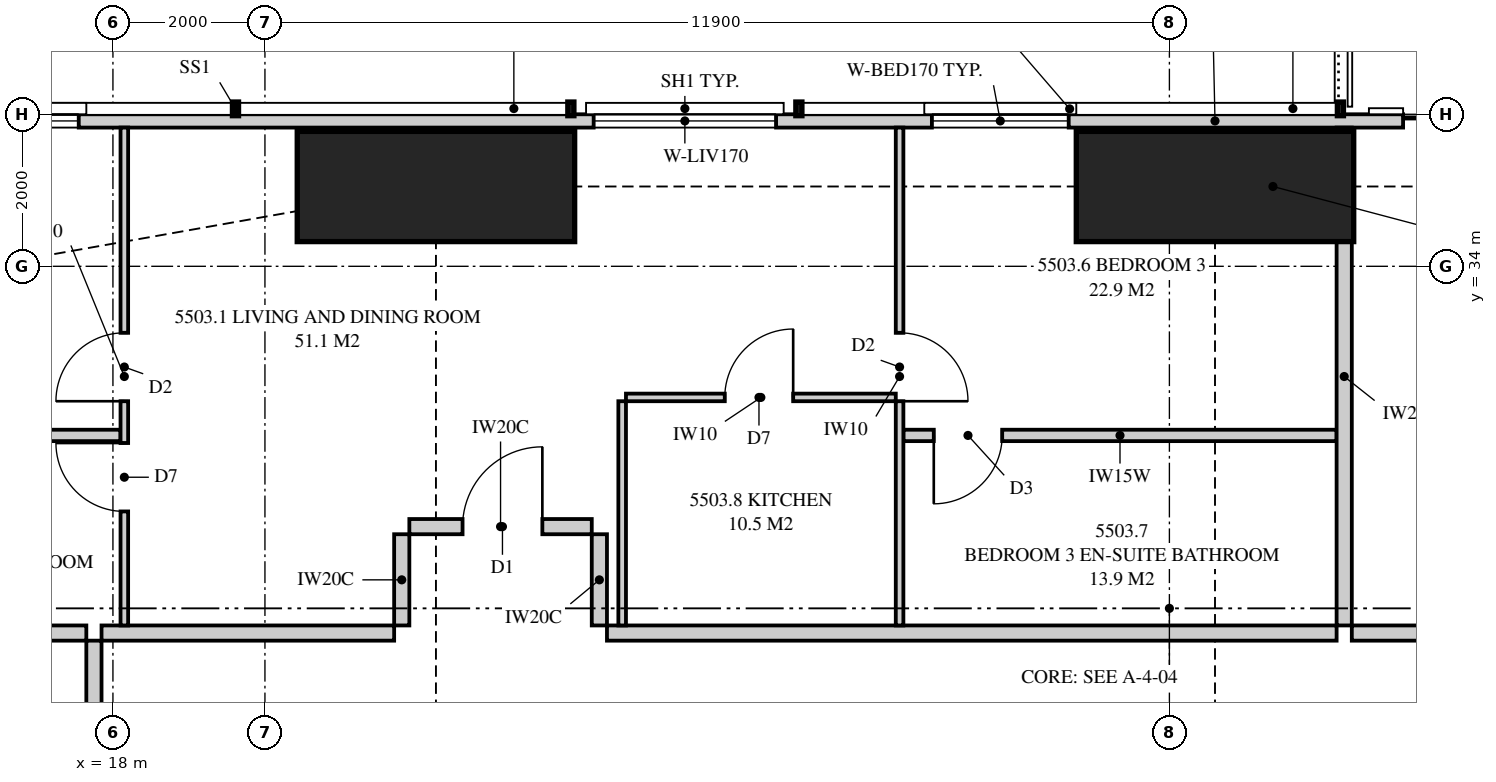
"""IFC4 building model, lengths in metres.
Left out: names, types, materials, properties, quantities, classifications, styles, units other than length and angle.
Written with IfcOpenShell. Run it as: python <this file> out.ifc"""

import sys

from ifc_helpers import new_model, si_unit, direction, frame, frame_2d, origin, origin_2d, place, context, subcontext, project, spatial, polyline, rectangle, outline, extrude, element, fill, save


model = new_model("IFC4")
c1 = context("Model", 3, precision=1e-05, world=origin(), true_north=direction((0.0, 1.0)))
c2 = subcontext(c1, "Body", "Model", "MODEL_VIEW")
j1 = project(units=[si_unit("LENGTHUNIT", "METRE"), si_unit("PLANEANGLEUNIT", "RADIAN")], contexts=[c1])
p1 = place(None, origin())
s1 = spatial("IfcSite", under=j1, at=p1, CompositionType="ELEMENT")
p2 = place(p1, origin())
s2 = spatial("IfcBuilding", under=s1, at=p2, CompositionType="ELEMENT")
p3 = place(p2, frame((0.0, 0.0, 201.25)))
s3 = spatial("IfcBuildingStorey", under=s2, at=p3, CompositionType="ELEMENT", Elevation=201.25)
for number, where, z_axis, x_axis in (
    (1, (32.5, 35.05, 0.0), (0.0, 0.0, 1.0), (0.0, 1.0, 0.0)),
    (2, (22.25, 35.05, 0.0), (0.0, 0.0, 1.0), (0.0, 1.0, 0.0)),
):
    element("IfcColumn", number, at=place(p3, frame(where, z_axis=z_axis, x_axis=x_axis)), inside=s3, PredefinedType="COLUMN", context=c2, shape_type="SweptSolid", body=[
        extrude(rectangle(XDim=1.45, YDim=3.65, at=origin_2d()), origin(), (0.0, 0.0, 1.0), 3.35),
    ])
p4 = place(p3, frame((49.949, 35.913, 0.0), z_axis=(0.0, 0.0, 1.0), x_axis=(-1.0, 0.0, 0.0)))
e3 = element("IfcWall", 3, at=p4, inside=s3, PredefinedType="SOLIDWALL", context=c2, shape_type="SweptSolid", body=[
    extrude(outline(polyline([(0.0, 0.0), (34.897, 0.0), (34.897, 3.11), (27.91, 3.11), (27.91, 2.15), (27.836, 2.15), (27.836, 3.11), (27.699, 3.11), (27.699, 2.15), (7.199, 2.15), (7.199, 3.11), (7.062, 3.11), (7.062, 2.15), (6.987, 2.15), (6.987, 3.11), (0.0, 3.11), (0.0, 0.0)])), frame((0.0, 0.087, 0.0), z_axis=(0.0, -1.0, 0.0), x_axis=(1.0, 0.0, 0.0)), (0.0, 0.0, 1.0), 0.175),
])
p5 = place(p4, frame((13.174, 0.0, 0.0)))
e4 = element("IfcOpeningElement", 4, at=p5, cuts=e3, PredefinedType="OPENING", context=c2, shape_type="SweptSolid", body=[
    extrude(rectangle(XDim=1.8, YDim=2.1, at=frame_2d((0.9, 1.05))), frame((0.0, 0.097, 0.0), z_axis=(0.0, -1.0, 0.0), x_axis=(1.0, 0.0, 0.0)), (0.0, 0.0, 1.0), 0.195),
])
p6 = place(p4, frame((19.374, 0.0, 0.4)))
e5 = element("IfcOpeningElement", 5, at=p6, cuts=e3, PredefinedType="OPENING", context=c2, shape_type="SweptSolid", body=[
    extrude(rectangle(XDim=1.8, YDim=1.7, at=frame_2d((0.9, 0.85))), frame((0.0, 0.097, 0.0), z_axis=(0.0, -1.0, 0.0), x_axis=(1.0, 0.0, 0.0)), (0.0, 0.0, 1.0), 0.195),
])
p7 = place(p4, frame((23.224, 0.0, 0.4)))
e6 = element("IfcOpeningElement", 6, at=p7, cuts=e3, PredefinedType="OPENING", context=c2, shape_type="SweptSolid", body=[
    extrude(rectangle(XDim=2.4, YDim=1.7, at=frame_2d((1.2, 0.85))), frame((0.0, 0.097, 0.0), z_axis=(0.0, -1.0, 0.0), x_axis=(1.0, 0.0, 0.0)), (0.0, 0.0, 1.0), 0.195),
])
p8 = place(p4, frame((32.399, 0.0, 0.4)))
e7 = element("IfcOpeningElement", 7, at=p8, cuts=e3, PredefinedType="OPENING", context=c2, shape_type="SweptSolid", body=[
    extrude(rectangle(XDim=1.8, YDim=1.7, at=frame_2d((0.9, 0.85))), frame((0.0, 0.097, 0.0), z_axis=(0.0, -1.0, 0.0), x_axis=(1.0, 0.0, 0.0)), (0.0, 0.0, 1.0), 0.195),
])
p9 = place(p3, frame((34.2, 35.825, 0.0), z_axis=(0.0, 0.0, 1.0), x_axis=(0.0, -1.0, 0.0)))
e8 = element("IfcWall", 8, at=p9, inside=s3, PredefinedType="PARTITIONING", context=c2, shape_type="SweptSolid", body=[
    extrude(outline(polyline([(0.0, 0.0), (6.55, 0.0), (6.55, 3.11), (1.685, 3.11), (1.685, 2.15), (0.0, 2.15), (0.0, 3.11), (0.0, 0.0)])), frame((0.0, 0.1, 0.0), z_axis=(0.0, -1.0, 0.0), x_axis=(1.0, 0.0, 0.0)), (0.0, 0.0, 1.0), 0.2),
])
p10 = place(p3, frame((17.85, 29.175, 0.0), z_axis=(0.0, 0.0, 1.0), x_axis=(1.0, 0.0, 0.0)))
e9 = element("IfcWall", 9, at=p10, inside=s3, PredefinedType="PARTITIONING", context=c2, shape_type="SweptSolid", body=[
    extrude(rectangle(XDim=3.85, YDim=0.2, at=frame_2d((1.925, 0.0))), origin(), (0.0, 0.0, 1.0), 3.11),
])
p11 = place(p3, frame((18.15, 35.825, 0.0), z_axis=(0.0, 0.0, 1.0), x_axis=(0.0, -1.0, 0.0)))
e10 = element("IfcWall", 10, at=p11, inside=s3, PredefinedType="PARTITIONING", context=c2, shape_type="SweptSolid", body=[
    extrude(outline(polyline([(0.0, 0.0), (6.55, 0.0), (6.55, 3.11), (2.374, 3.11), (2.374, 2.15), (0.627, 2.15), (0.627, 3.11), (0.0, 3.11), (0.0, 0.0)])), frame((0.0, 0.05, 0.0), z_axis=(0.0, -1.0, 0.0), x_axis=(1.0, 0.0, 0.0)), (0.0, 0.0, 1.0), 0.1),
])
p12 = place(p11, frame((2.7, 0.0, 0.0)))
e11 = element("IfcOpeningElement", 11, at=p12, cuts=e10, PredefinedType="OPENING", context=c2, shape_type="SweptSolid", body=[
    extrude(rectangle(XDim=0.9, YDim=2.1, at=frame_2d((0.45, 1.05))), frame((0.0, 0.06, 0.0), z_axis=(0.0, -1.0, 0.0), x_axis=(1.0, 0.0, 0.0)), (0.0, 0.0, 1.0), 0.12),
])
p13 = place(p11, frame((4.15, 0.0, 0.0)))
e12 = element("IfcOpeningElement", 12, at=p13, cuts=e10, PredefinedType="OPENING", context=c2, shape_type="SweptSolid", body=[
    extrude(rectangle(XDim=0.9, YDim=2.1, at=frame_2d((0.45, 1.05))), frame((0.0, 0.06, 0.0), z_axis=(0.0, -1.0, 0.0), x_axis=(1.0, 0.0, 0.0)), (0.0, 0.0, 1.0), 0.12),
])
p14 = place(p3, frame((28.35, 35.825, 0.0), z_axis=(0.0, 0.0, 1.0), x_axis=(0.0, -1.0, 0.0)))
e13 = element("IfcWall", 13, at=p14, inside=s3, PredefinedType="PARTITIONING", context=c2, shape_type="SweptSolid", body=[
    extrude(outline(polyline([(0.0, 0.0), (6.55, 0.0), (6.55, 3.11), (1.635, 3.11), (1.635, 2.15), (0.0, 2.15), (0.0, 3.11), (0.0, 0.0)])), frame((0.0, 0.05, 0.0), z_axis=(0.0, -1.0, 0.0), x_axis=(1.0, 0.0, 0.0)), (0.0, 0.0, 1.0), 0.1),
])
p15 = place(p14, frame((2.7, 0.0, 0.0)))
e14 = element("IfcOpeningElement", 14, at=p15, cuts=e13, PredefinedType="OPENING", context=c2, shape_type="SweptSolid", body=[
    extrude(rectangle(XDim=0.9, YDim=2.1, at=frame_2d((0.45, 1.05))), frame((0.0, 0.06, 0.0), z_axis=(0.0, -1.0, 0.0), x_axis=(1.0, 0.0, 0.0)), (0.0, 0.0, 1.0), 0.12),
])
p16 = place(p3, frame((15.2, 31.775, 0.0), z_axis=(0.0, 0.0, 1.0), x_axis=(1.0, 0.0, 0.0)))
e15 = element("IfcWall", 15, at=p16, inside=s3, PredefinedType="PLUMBINGWALL", context=c2, shape_type="SweptSolid", body=[
    extrude(rectangle(XDim=2.9, YDim=0.15, at=frame_2d((1.45, 0.0))), origin(), (0.0, 0.0, 1.0), 3.11),
])
p17 = place(p3, frame((28.4, 31.775, 0.0), z_axis=(0.0, 0.0, 1.0), x_axis=(1.0, 0.0, 0.0)))
e16 = element("IfcWall", 16, at=p17, inside=s3, PredefinedType="PLUMBINGWALL", context=c2, shape_type="SweptSolid", body=[
    extrude(outline(polyline([(0.0, 0.0), (5.7, 0.0), (5.7, 3.11), (4.412, 3.11), (4.412, 2.541), (3.788, 2.541), (3.788, 3.11), (0.0, 3.11), (0.0, 0.0)])), frame((0.0, 0.075, 0.0), z_axis=(0.0, -1.0, 0.0), x_axis=(1.0, 0.0, 0.0)), (0.0, 0.0, 1.0), 0.15),
])
p18 = place(p17, frame((0.4, 0.0, 0.0)))
e17 = element("IfcOpeningElement", 17, at=p18, cuts=e16, PredefinedType="OPENING", context=c2, shape_type="SweptSolid", body=[
    extrude(rectangle(XDim=0.9, YDim=2.1, at=frame_2d((0.45, 1.05))), frame((0.0, 0.085, 0.0), z_axis=(0.0, -1.0, 0.0), x_axis=(1.0, 0.0, 0.0)), (0.0, 0.0, 1.0), 0.17),
])
p19 = place(p3, frame((24.75, 32.275, 0.0), z_axis=(0.0, 0.0, 1.0), x_axis=(1.0, 0.0, 0.0)))
e18 = element("IfcWall", 18, at=p19, inside=s3, PredefinedType="PARTITIONING", context=c2, shape_type="SweptSolid", body=[
    extrude(rectangle(XDim=3.55, YDim=0.1, at=frame_2d((1.775, 0.0))), origin(), (0.0, 0.0, 1.0), 3.11),
])
p20 = place(p19, frame((1.3, 0.0, 0.0)))
e19 = element("IfcOpeningElement", 19, at=p20, cuts=e18, PredefinedType="OPENING", context=c2, shape_type="SweptSolid", body=[
    extrude(rectangle(XDim=0.9, YDim=2.1, at=frame_2d((0.45, 1.05))), frame((0.0, 0.06, 0.0), z_axis=(0.0, -1.0, 0.0), x_axis=(1.0, 0.0, 0.0)), (0.0, 0.0, 1.0), 0.12),
])
p21 = place(p3, frame((24.7, 32.225, 0.0), z_axis=(0.0, 0.0, 1.0), x_axis=(0.0, -1.0, 0.0)))
e20 = element("IfcWall", 20, at=p21, inside=s3, PredefinedType="PARTITIONING", context=c2, shape_type="SweptSolid", body=[
    extrude(rectangle(XDim=2.95, YDim=0.1, at=frame_2d((1.475, 0.0))), origin(), (0.0, 0.0, 1.0), 3.11),
])
p22 = place(p3, frame((34.3, 29.175, 0.0), z_axis=(0.0, 0.0, 1.0), x_axis=(1.0, 0.0, 0.0)))
e21 = element("IfcWall", 21, at=p22, inside=s3, PredefinedType="PARTITIONING", context=c2, shape_type="SweptSolid", body=[
    extrude(rectangle(XDim=3.625, YDim=0.2, at=frame_2d((1.812, 0.0))), origin(), (0.0, 0.0, 1.0), 3.11),
])
p23 = place(p3, frame((12.0, 29.175, 0.0), z_axis=(0.0, 0.0, 1.0), x_axis=(1.0, 0.0, 0.0)))
e22 = element("IfcWall", 22, at=p23, inside=s3, PredefinedType="PARTITIONING", context=c2, shape_type="SweptSolid", body=[
    extrude(outline(polyline([(0.0, 0.0), (5.65, 0.0), (5.65, 3.11), (2.547, 3.11), (2.547, 2.15), (0.703, 2.15), (0.703, 3.11), (0.0, 3.11), (0.0, 0.0)])), frame((0.0, 0.1, 0.0), z_axis=(0.0, -1.0, 0.0), x_axis=(1.0, 0.0, 0.0)), (0.0, 0.0, 1.0), 0.2),
])
p24 = place(p3, frame((17.75, 23.05, 0.0), z_axis=(0.0, 0.0, 1.0), x_axis=(0.0, 1.0, 0.0)))
e23 = element("IfcWall", 23, at=p24, inside=s3, PredefinedType="PARTITIONING", context=c2, shape_type="SweptSolid", body=[
    extrude(outline(polyline([(0.0, 0.0), (6.025, 0.0), (6.025, 3.11), (2.287, 3.11), (2.287, 2.541), (1.613, 2.541), (1.613, 3.11), (0.0, 3.11), (0.0, 0.0)])), frame((0.0, 0.1, 0.0), z_axis=(0.0, -1.0, 0.0), x_axis=(1.0, 0.0, 0.0)), (0.0, 0.0, 1.0), 0.2),
])
p25 = place(p24, frame((2.512, 0.0, 0.0)))
e24 = element("IfcOpeningElement", 24, at=p25, cuts=e23, PredefinedType="OPENING", context=c2, shape_type="SweptSolid", body=[
    extrude(rectangle(XDim=1.05, YDim=2.2, at=frame_2d((0.525, 1.1))), frame((0.0, 0.11, 0.0), z_axis=(0.0, -1.0, 0.0), x_axis=(1.0, 0.0, 0.0)), (0.0, 0.0, 1.0), 0.22),
])
p26 = place(p3, frame((24.5, 29.175, 0.0), z_axis=(0.0, 0.0, 1.0), x_axis=(1.0, 0.0, 0.0)))
e25 = element("IfcWall", 25, at=p26, inside=s3, PredefinedType="PARTITIONING", context=c2, shape_type="SweptSolid", body=[
    extrude(outline(polyline([(0.0, 0.0), (9.6, 0.0), (9.6, 3.11), (8.337, 3.11), (8.337, 2.541), (7.663, 2.541), (7.663, 3.11), (0.0, 3.11), (0.0, 0.0)])), frame((0.0, 0.1, 0.0), z_axis=(0.0, -1.0, 0.0), x_axis=(1.0, 0.0, 0.0)), (0.0, 0.0, 1.0), 0.2),
])
p27 = place(p3, frame((21.9, 30.575, 0.0), z_axis=(0.0, 0.0, 1.0), x_axis=(1.0, 0.0, 0.0)))
e26 = element("IfcWall", 26, at=p27, inside=s3, PredefinedType="PARTITIONING", context=c2, shape_type="SweptSolid", body=[
    extrude(outline(polyline([(0.0, 0.0), (2.4, 0.0), (2.4, 3.11), (0.687, 3.11), (0.687, 2.541), (0.013, 2.541), (0.013, 3.11), (0.0, 3.11), (0.0, 0.0)])), frame((0.0, 0.1, 0.0), z_axis=(0.0, -1.0, 0.0), x_axis=(1.0, 0.0, 0.0)), (0.0, 0.0, 1.0), 0.2),
])
p28 = place(p27, frame((0.7, 0.0, 0.0)))
e27 = element("IfcOpeningElement", 27, at=p28, cuts=e26, PredefinedType="OPENING", context=c2, shape_type="SweptSolid", body=[
    extrude(rectangle(XDim=1.05, YDim=2.2, at=frame_2d((0.525, 1.1))), frame((0.0, 0.11, 0.0), z_axis=(0.0, -1.0, 0.0), x_axis=(1.0, 0.0, 0.0)), (0.0, 0.0, 1.0), 0.22),
])
for number, where, z_axis, x_axis in (
    (28, (21.8, 29.275, 0.0), (0.0, 0.0, 1.0), (0.0, 1.0, 0.0)),
    (29, (24.4, 29.275, 0.0), (0.0, 0.0, 1.0), (0.0, 1.0, 0.0)),
):
    element("IfcWall", number, at=place(p3, frame(where, z_axis=z_axis, x_axis=x_axis)), inside=s3, PredefinedType="PARTITIONING", context=c2, shape_type="SweptSolid", body=[
        extrude(rectangle(XDim=1.2, YDim=0.2, at=frame_2d((0.6, 0.0))), origin(), (0.0, 0.0, 1.0), 3.11),
    ])
p29 = place(p5, origin())
e30 = element("IfcDoor", 30, at=p29, inside=s3, OperationType="SLIDING_TO_LEFT", PredefinedType="DOOR", context=c2, shape_type="SweptSolid", body=[
    extrude(rectangle(XDim=1.8, YDim=2.1, at=frame_2d((0.9, 1.05))), frame((0.0, 0.025, 0.0), z_axis=(0.0, -1.0, 0.0), x_axis=(1.0, 0.0, 0.0)), (0.0, 0.0, 1.0), 0.05),
])
fill(e4, e30)
p30 = place(p6, origin())
e31 = element("IfcWindow", 31, at=p30, inside=s3, PartitioningType="SINGLE_PANEL", PredefinedType="WINDOW", context=c2, shape_type="SweptSolid", body=[
    extrude(rectangle(XDim=1.8, YDim=1.7, at=frame_2d((0.9, 0.85))), frame((0.0, 0.03, 0.0), z_axis=(0.0, -1.0, 0.0), x_axis=(1.0, 0.0, 0.0)), (0.0, 0.0, 1.0), 0.06),
])
fill(e5, e31)
p31 = place(p7, origin())
e32 = element("IfcWindow", 32, at=p31, inside=s3, PartitioningType="SINGLE_PANEL", PredefinedType="WINDOW", context=c2, shape_type="SweptSolid", body=[
    extrude(rectangle(XDim=2.4, YDim=1.7, at=frame_2d((1.2, 0.85))), frame((0.0, 0.03, 0.0), z_axis=(0.0, -1.0, 0.0), x_axis=(1.0, 0.0, 0.0)), (0.0, 0.0, 1.0), 0.06),
])
fill(e6, e32)
p32 = place(p8, origin())
e33 = element("IfcWindow", 33, at=p32, inside=s3, PartitioningType="SINGLE_PANEL", PredefinedType="WINDOW", context=c2, shape_type="SweptSolid", body=[
    extrude(rectangle(XDim=1.8, YDim=1.7, at=frame_2d((0.9, 0.85))), frame((0.0, 0.03, 0.0), z_axis=(0.0, -1.0, 0.0), x_axis=(1.0, 0.0, 0.0)), (0.0, 0.0, 1.0), 0.06),
])
fill(e7, e33)
p33 = place(p28, origin())
e34 = element("IfcDoor", 34, at=p33, inside=s3, OperationType="SINGLE_SWING_RIGHT", PredefinedType="DOOR", context=c2, shape_type="SweptSolid", body=[
    extrude(rectangle(XDim=1.05, YDim=2.2, at=frame_2d((0.525, 1.1))), frame((0.0, 0.025, 0.0), z_axis=(0.0, -1.0, 0.0), x_axis=(1.0, 0.0, 0.0)), (0.0, 0.0, 1.0), 0.05),
])
fill(e27, e34)
p34 = place(p12, frame((0.9, 0.0, 0.0), z_axis=(0.0, 0.0, 1.0), x_axis=(-1.0, 0.0, 0.0)))
e35 = element("IfcDoor", 35, at=p34, inside=s3, OperationType="SINGLE_SWING_LEFT", PredefinedType="DOOR", context=c2, shape_type="SweptSolid", body=[
    extrude(rectangle(XDim=0.9, YDim=2.1, at=frame_2d((0.45, 1.05))), frame((0.0, 0.025, 0.0), z_axis=(0.0, -1.0, 0.0), x_axis=(1.0, 0.0, 0.0)), (0.0, 0.0, 1.0), 0.05),
])
fill(e11, e35)
p35 = place(p13, frame((0.9, 0.0, 0.0), z_axis=(0.0, 0.0, 1.0), x_axis=(-1.0, 0.0, 0.0)))
e36 = element("IfcDoor", 36, at=p35, inside=s3, OperationType="SINGLE_SWING_RIGHT", PredefinedType="DOOR", context=c2, shape_type="SweptSolid", body=[
    extrude(rectangle(XDim=0.9, YDim=2.1, at=frame_2d((0.45, 1.05))), frame((0.0, 0.025, 0.0), z_axis=(0.0, -1.0, 0.0), x_axis=(1.0, 0.0, 0.0)), (0.0, 0.0, 1.0), 0.05),
])
fill(e12, e36)
p36 = place(p15, origin())
e37 = element("IfcDoor", 37, at=p36, inside=s3, OperationType="SINGLE_SWING_RIGHT", PredefinedType="DOOR", context=c2, shape_type="SweptSolid", body=[
    extrude(rectangle(XDim=0.9, YDim=2.1, at=frame_2d((0.45, 1.05))), frame((0.0, 0.025, 0.0), z_axis=(0.0, -1.0, 0.0), x_axis=(1.0, 0.0, 0.0)), (0.0, 0.0, 1.0), 0.05),
])
fill(e14, e37)
p37 = place(p18, frame((0.9, 0.0, 0.0), z_axis=(0.0, 0.0, 1.0), x_axis=(-1.0, 0.0, 0.0)))
e38 = element("IfcDoor", 38, at=p37, inside=s3, OperationType="SINGLE_SWING_RIGHT", PredefinedType="DOOR", context=c2, shape_type="SweptSolid", body=[
    extrude(rectangle(XDim=0.9, YDim=2.1, at=frame_2d((0.45, 1.05))), frame((0.0, 0.025, 0.0), z_axis=(0.0, -1.0, 0.0), x_axis=(1.0, 0.0, 0.0)), (0.0, 0.0, 1.0), 0.05),
])
fill(e17, e38)
p38 = place(p20, origin())
e39 = element("IfcDoor", 39, at=p38, inside=s3, OperationType="SINGLE_SWING_RIGHT", PredefinedType="DOOR", context=c2, shape_type="SweptSolid", body=[
    extrude(rectangle(XDim=0.9, YDim=2.1, at=frame_2d((0.45, 1.05))), frame((0.0, 0.025, 0.0), z_axis=(0.0, -1.0, 0.0), x_axis=(1.0, 0.0, 0.0)), (0.0, 0.0, 1.0), 0.05),
])
fill(e19, e39)
save(model, sys.argv[1])
